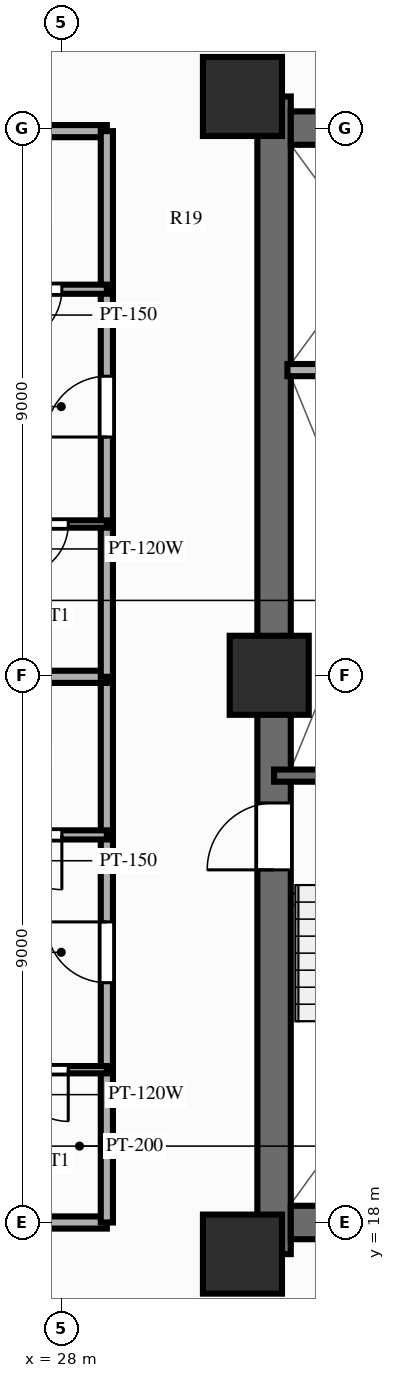
"""IFC4 building model, lengths in metres.
Left out: names, types, materials, properties, quantities, classifications, styles, units other than length and angle.
Written with IfcOpenShell. Run it as: python <this file> out.ifc"""

import sys

from ifc_helpers import new_model, si_unit, direction, frame, frame_2d, origin, origin_2d, place, context, subcontext, project, spatial, rectangle, extrude, source, transform, mapped, element, fill, save


model = new_model("IFC4")
c1 = context("Model", 3, precision=1e-05, world=origin(), true_north=direction((0.0, 1.0)))
c2 = subcontext(c1, "Body", "Model", "MODEL_VIEW")
j1 = project(units=[si_unit("LENGTHUNIT", "METRE"), si_unit("PLANEANGLEUNIT", "RADIAN")], contexts=[c1])
p1 = place(None, origin())
s1 = spatial("IfcSite", under=j1, at=p1, CompositionType="ELEMENT")
p2 = place(p1, origin())
s2 = spatial("IfcBuilding", under=s1, at=p2, CompositionType="ELEMENT")
p3 = place(p2, frame((0.0, 0.0, 77.85)))
s3 = spatial("IfcBuildingStorey", under=s2, at=p3, CompositionType="ELEMENT", Elevation=77.85)
p4 = place(p3, frame((31.5, 17.48, 0.0), z_axis=(0.0, 0.0, 1.0), x_axis=(0.0, 1.0, 0.0)))
e1 = element("IfcWall", 1, at=p4, inside=s3, PredefinedType="SHEAR", context=c2, shape_type="SweptSolid", body=[
    extrude(rectangle(XDim=19.04, YDim=0.55, at=frame_2d((9.52, 0.0))), origin(), (0.0, 0.0, 1.0), 3.0),
])
p5 = place(p4, frame((6.32, 0.0, 0.0)))
e2 = element("IfcOpeningElement", 2, at=p5, cuts=e1, PredefinedType="OPENING", context=c2, shape_type="SweptSolid", body=[
    extrude(rectangle(XDim=1.1, YDim=2.15, at=frame_2d((0.55, 1.075))), frame((0.0, 0.287, 0.0), z_axis=(0.0, -1.0, 0.0), x_axis=(1.0, 0.0, 0.0)), (0.0, 0.0, 1.0), 0.574),
])
p6 = place(p3, frame((31.775, 18.0, 0.0), z_axis=(0.0, 0.0, 1.0), x_axis=(1.0, 0.0, 0.0)))
e3 = element("IfcWall", 3, at=p6, inside=s3, PredefinedType="SHEAR", context=c2, shape_type="SweptSolid", body=[
    extrude(rectangle(XDim=12.45, YDim=0.55, at=frame_2d((6.225, 0.0))), origin(), (0.0, 0.0, 1.0), 3.0),
])
p7 = place(p3, frame((31.775, 36.0, 0.0), z_axis=(0.0, 0.0, 1.0), x_axis=(1.0, 0.0, 0.0)))
e4 = element("IfcWall", 4, at=p7, inside=s3, PredefinedType="SHEAR", context=c2, shape_type="SweptSolid", body=[
    extrude(rectangle(XDim=12.45, YDim=0.55, at=frame_2d((6.225, 0.0))), origin(), (0.0, 0.0, 1.0), 3.0),
])
p8 = place(p7, frame((5.175, 0.0, 0.0), z_axis=(0.0, 0.0, 1.0), x_axis=(-1.0, 0.0, 0.0)))
e5 = element("IfcOpeningElement", 5, at=p8, cuts=e4, PredefinedType="OPENING", context=c2, shape_type="SweptSolid", body=[
    extrude(rectangle(XDim=1.4, YDim=2.15, at=frame_2d((0.7, 1.075))), frame((0.0, 0.287, 0.0), z_axis=(0.0, -1.0, 0.0), x_axis=(1.0, 0.0, 0.0)), (0.0, 0.0, 1.0), 0.574),
])
m1 = source(origin(), c2, "Body", "SweptSolid", [
    extrude(rectangle(XDim=1.3, YDim=1.3, at=origin_2d()), origin(), (0.0, 0.0, 1.0), 3.0),
])
for number, where, z_axis, x_axis in (
    (6, (30.98, 17.48, 0.0), (0.0, 0.0, 1.0), (1.0, 0.0, 0.0)),
    (7, (30.98, 36.52, 0.0), (0.0, 0.0, 1.0), (1.0, 0.0, 0.0)),
    (8, (31.42, 27.0, 0.0), (0.0, 0.0, 1.0), (1.0, 0.0, 0.0)),
):
    element("IfcColumn", number, at=place(p3, frame(where, z_axis=z_axis, x_axis=x_axis)), inside=s3, PredefinedType="COLUMN", context=c2, shape_type="MappedRepresentation", body=[
        mapped(m1, transform((0.0, 0.0, 0.0), scale=1.0)),
    ])
p9 = place(p3, frame((31.5, 25.35, 0.0), z_axis=(0.0, 0.0, 1.0), x_axis=(1.0, 0.0, 0.0)))
e9 = element("IfcWall", 9, at=p9, inside=s3, PredefinedType="SOLIDWALL", context=c2, shape_type="SweptSolid", body=[
    extrude(rectangle(XDim=3.93, YDim=0.2, at=frame_2d((1.965, 0.0))), origin(), (0.0, 0.0, 1.0), 2.79),
])
p10 = place(p3, frame((31.72, 32.02, 0.0), z_axis=(0.0, 0.0, 1.0), x_axis=(1.0, 0.0, 0.0)))
e10 = element("IfcWall", 10, at=p10, inside=s3, PredefinedType="PARTITIONING", context=c2, shape_type="SweptSolid", body=[
    extrude(rectangle(XDim=2.8, YDim=0.2, at=frame_2d((1.4, 0.0))), origin(), (0.0, 0.0, 1.0), 2.79),
])
for number, where, z_axis, x_axis in (
    (11, (28.75, 18.0, 0.0), (0.0, 0.0, 1.0), (-1.0, 0.0, 0.0)),
    (12, (28.75, 35.95, 0.0), (0.0, 0.0, 1.0), (-1.0, 0.0, 0.0)),
):
    element("IfcWall", number, at=place(p3, frame(where, z_axis=z_axis, x_axis=x_axis)), inside=s3, PredefinedType="PARTITIONING", context=c2, shape_type="SweptSolid", body=[
        extrude(rectangle(XDim=16.6, YDim=0.2, at=frame_2d((8.3, 0.0))), origin(), (0.0, 0.0, 1.0), 2.34),
    ])
p11 = place(p3, frame((28.75, 18.0, 0.0), z_axis=(0.0, 0.0, 1.0), x_axis=(0.0, 1.0, 0.0)))
e13 = element("IfcWall", 13, at=p11, inside=s3, PredefinedType="PARTITIONING", context=c2, shape_type="SweptSolid", body=[
    extrude(rectangle(XDim=2.513, YDim=0.2, at=frame_2d((1.256, 0.0))), origin(), (0.0, 0.0, 1.0), 2.79),
])
p12 = place(p3, frame((28.75, 20.513, 0.0), z_axis=(0.0, 0.0, 1.0), x_axis=(0.0, 1.0, 0.0)))
e14 = element("IfcWall", 14, at=p12, inside=s3, PredefinedType="PARTITIONING", context=c2, shape_type="SweptSolid", body=[
    extrude(rectangle(XDim=3.862, YDim=0.2, at=frame_2d((1.931, 0.0))), origin(), (0.0, 0.0, 1.0), 2.79),
])
p13 = place(p12, frame((1.431, 0.0, 0.0)))
e15 = element("IfcOpeningElement", 15, at=p13, cuts=e14, PredefinedType="OPENING", context=c2, shape_type="SweptSolid", body=[
    extrude(rectangle(XDim=1.0, YDim=2.15, at=frame_2d((0.5, 1.075))), frame((0.0, 0.112, 0.0), z_axis=(0.0, -1.0, 0.0), x_axis=(1.0, 0.0, 0.0)), (0.0, 0.0, 1.0), 0.224),
])
p14 = place(p3, frame((28.75, 24.375, 0.0), z_axis=(0.0, 0.0, 1.0), x_axis=(0.0, 1.0, 0.0)))
e16 = element("IfcWall", 16, at=p14, inside=s3, PredefinedType="PARTITIONING", context=c2, shape_type="SweptSolid", body=[
    extrude(rectangle(XDim=2.6, YDim=0.2, at=frame_2d((1.3, 0.0))), origin(), (0.0, 0.0, 1.0), 2.79),
])
p15 = place(p3, frame((28.75, 20.513, 0.0), z_axis=(0.0, 0.0, 1.0), x_axis=(-1.0, 0.0, 0.0)))
e17 = element("IfcWall", 17, at=p15, inside=s3, PredefinedType="PARTITIONING", context=c2, shape_type="SweptSolid", body=[
    extrude(rectangle(XDim=2.12, YDim=0.12, at=frame_2d((1.06, 0.0))), origin(), (0.0, 0.0, 1.0), 2.79),
])
p16 = place(p15, frame((0.635, 0.0, 0.0)))
e18 = element("IfcOpeningElement", 18, at=p16, cuts=e17, PredefinedType="OPENING", context=c2, shape_type="SweptSolid", body=[
    extrude(rectangle(XDim=0.85, YDim=2.05, at=frame_2d((0.425, 1.025))), frame((0.0, 0.072, 0.0), z_axis=(0.0, -1.0, 0.0), x_axis=(1.0, 0.0, 0.0)), (0.0, 0.0, 1.0), 0.144),
])
p17 = place(p3, frame((28.75, 24.375, 0.0), z_axis=(0.0, 0.0, 1.0), x_axis=(-1.0, 0.0, 0.0)))
e19 = element("IfcWall", 19, at=p17, inside=s3, PredefinedType="PARTITIONING", context=c2, shape_type="SweptSolid", body=[
    extrude(rectangle(XDim=2.38, YDim=0.15, at=frame_2d((1.19, 0.0))), origin(), (0.0, 0.0, 1.0), 2.79),
])
p18 = place(p17, frame((0.74, 0.0, 0.0)))
e20 = element("IfcOpeningElement", 20, at=p18, cuts=e19, PredefinedType="OPENING", context=c2, shape_type="SweptSolid", body=[
    extrude(rectangle(XDim=0.9, YDim=2.1, at=frame_2d((0.45, 1.05))), frame((0.0, 0.087, 0.0), z_axis=(0.0, -1.0, 0.0), x_axis=(1.0, 0.0, 0.0)), (0.0, 0.0, 1.0), 0.174),
])
p19 = place(p3, frame((28.75, 26.975, 0.0), z_axis=(0.0, 0.0, 1.0), x_axis=(-1.0, 0.0, 0.0)))
e21 = element("IfcWall", 21, at=p19, inside=s3, PredefinedType="PARTITIONING", context=c2, shape_type="SweptSolid", body=[
    extrude(rectangle(XDim=16.6, YDim=0.2, at=frame_2d((8.3, 0.0))), origin(), (0.0, 0.0, 1.0), 2.79),
])
p20 = place(p3, frame((28.75, 26.975, 0.0), z_axis=(0.0, 0.0, 1.0), x_axis=(0.0, 1.0, 0.0)))
e22 = element("IfcWall", 22, at=p20, inside=s3, PredefinedType="PARTITIONING", context=c2, shape_type="SweptSolid", body=[
    extrude(rectangle(XDim=2.513, YDim=0.2, at=frame_2d((1.256, 0.0))), origin(), (0.0, 0.0, 1.0), 2.79),
])
p21 = place(p3, frame((28.75, 29.488, 0.0), z_axis=(0.0, 0.0, 1.0), x_axis=(0.0, 1.0, 0.0)))
e23 = element("IfcWall", 23, at=p21, inside=s3, PredefinedType="PARTITIONING", context=c2, shape_type="SweptSolid", body=[
    extrude(rectangle(XDim=3.862, YDim=0.2, at=frame_2d((1.931, 0.0))), origin(), (0.0, 0.0, 1.0), 2.79),
])
p22 = place(p21, frame((1.431, 0.0, 0.0)))
e24 = element("IfcOpeningElement", 24, at=p22, cuts=e23, PredefinedType="OPENING", context=c2, shape_type="SweptSolid", body=[
    extrude(rectangle(XDim=1.0, YDim=2.15, at=frame_2d((0.5, 1.075))), frame((0.0, 0.112, 0.0), z_axis=(0.0, -1.0, 0.0), x_axis=(1.0, 0.0, 0.0)), (0.0, 0.0, 1.0), 0.224),
])
p23 = place(p3, frame((28.75, 33.35, 0.0), z_axis=(0.0, 0.0, 1.0), x_axis=(0.0, 1.0, 0.0)))
e25 = element("IfcWall", 25, at=p23, inside=s3, PredefinedType="PARTITIONING", context=c2, shape_type="SweptSolid", body=[
    extrude(rectangle(XDim=2.6, YDim=0.2, at=frame_2d((1.3, 0.0))), origin(), (0.0, 0.0, 1.0), 2.79),
])
p24 = place(p3, frame((28.75, 29.488, 0.0), z_axis=(0.0, 0.0, 1.0), x_axis=(-1.0, 0.0, 0.0)))
e26 = element("IfcWall", 26, at=p24, inside=s3, PredefinedType="PARTITIONING", context=c2, shape_type="SweptSolid", body=[
    extrude(rectangle(XDim=2.12, YDim=0.12, at=frame_2d((1.06, 0.0))), origin(), (0.0, 0.0, 1.0), 2.79),
])
p25 = place(p24, frame((0.635, 0.0, 0.0)))
e27 = element("IfcOpeningElement", 27, at=p25, cuts=e26, PredefinedType="OPENING", context=c2, shape_type="SweptSolid", body=[
    extrude(rectangle(XDim=0.85, YDim=2.05, at=frame_2d((0.425, 1.025))), frame((0.0, 0.072, 0.0), z_axis=(0.0, -1.0, 0.0), x_axis=(1.0, 0.0, 0.0)), (0.0, 0.0, 1.0), 0.144),
])
p26 = place(p3, frame((28.75, 33.35, 0.0), z_axis=(0.0, 0.0, 1.0), x_axis=(-1.0, 0.0, 0.0)))
e28 = element("IfcWall", 28, at=p26, inside=s3, PredefinedType="PARTITIONING", context=c2, shape_type="SweptSolid", body=[
    extrude(rectangle(XDim=2.38, YDim=0.15, at=frame_2d((1.19, 0.0))), origin(), (0.0, 0.0, 1.0), 2.79),
])
p27 = place(p26, frame((0.74, 0.0, 0.0)))
e29 = element("IfcOpeningElement", 29, at=p27, cuts=e28, PredefinedType="OPENING", context=c2, shape_type="SweptSolid", body=[
    extrude(rectangle(XDim=0.9, YDim=2.1, at=frame_2d((0.45, 1.05))), frame((0.0, 0.087, 0.0), z_axis=(0.0, -1.0, 0.0), x_axis=(1.0, 0.0, 0.0)), (0.0, 0.0, 1.0), 0.174),
])
m2 = source(origin(), c2, "Body", "SweptSolid", [
    extrude(rectangle(XDim=1.1, YDim=2.15, at=frame_2d((0.55, 1.075))), frame((0.0, 0.025, 0.0), z_axis=(0.0, -1.0, 0.0), x_axis=(1.0, 0.0, 0.0)), (0.0, 0.0, 1.0), 0.05),
])
p28 = place(p5, origin())
e30 = element("IfcDoor", 30, at=p28, inside=s3, OperationType="SINGLE_SWING_LEFT", PredefinedType="DOOR", context=c2, shape_type="MappedRepresentation", body=[
    mapped(m2, transform((0.0, 0.0, 0.0), scale=1.0)),
])
fill(e2, e30)
m3 = source(origin(), c2, "Body", "SweptSolid", [
    extrude(rectangle(XDim=1.0, YDim=2.15, at=frame_2d((0.5, 1.075))), frame((0.0, 0.025, 0.0), z_axis=(0.0, -1.0, 0.0), x_axis=(1.0, 0.0, 0.0)), (0.0, 0.0, 1.0), 0.05),
])
p29 = place(p13, origin())
e31 = element("IfcDoor", 31, at=p29, inside=s3, OperationType="SINGLE_SWING_RIGHT", PredefinedType="DOOR", context=c2, shape_type="MappedRepresentation", body=[
    mapped(m3, transform((0.0, 0.0, 0.0), scale=1.0)),
])
fill(e15, e31)
m4 = source(origin(), c2, "Body", "SweptSolid", [
    extrude(rectangle(XDim=0.85, YDim=2.05, at=frame_2d((0.425, 1.025))), frame((0.0, 0.025, 0.0), z_axis=(0.0, -1.0, 0.0), x_axis=(1.0, 0.0, 0.0)), (0.0, 0.0, 1.0), 0.05),
])
p30 = place(p16, origin())
e32 = element("IfcDoor", 32, at=p30, inside=s3, OperationType="SINGLE_SWING_LEFT", PredefinedType="DOOR", context=c2, shape_type="MappedRepresentation", body=[
    mapped(m4, transform((0.0, 0.0, 0.0), scale=1.0)),
])
fill(e18, e32)
m5 = source(origin(), c2, "Body", "SweptSolid", [
    extrude(rectangle(XDim=0.9, YDim=2.1, at=frame_2d((0.45, 1.05))), frame((0.0, 0.025, 0.0), z_axis=(0.0, -1.0, 0.0), x_axis=(1.0, 0.0, 0.0)), (0.0, 0.0, 1.0), 0.05),
])
p31 = place(p18, origin())
e33 = element("IfcDoor", 33, at=p31, inside=s3, OperationType="SINGLE_SWING_LEFT", PredefinedType="DOOR", context=c2, shape_type="MappedRepresentation", body=[
    mapped(m5, transform((0.0, 0.0, 0.0), scale=1.0)),
])
fill(e20, e33)
p32 = place(p22, origin())
e34 = element("IfcDoor", 34, at=p32, inside=s3, OperationType="SINGLE_SWING_LEFT", PredefinedType="DOOR", context=c2, shape_type="MappedRepresentation", body=[
    mapped(m3, transform((0.0, 0.0, 0.0), scale=1.0)),
])
fill(e24, e34)
p33 = place(p25, origin())
e35 = element("IfcDoor", 35, at=p33, inside=s3, OperationType="SINGLE_SWING_RIGHT", PredefinedType="DOOR", context=c2, shape_type="MappedRepresentation", body=[
    mapped(m4, transform((0.0, 0.0, 0.0), scale=1.0)),
])
fill(e27, e35)
p34 = place(p27, origin())
e36 = element("IfcDoor", 36, at=p34, inside=s3, OperationType="SINGLE_SWING_RIGHT", PredefinedType="DOOR", context=c2, shape_type="MappedRepresentation", body=[
    mapped(m5, transform((0.0, 0.0, 0.0), scale=1.0)),
])
fill(e29, e36)
save(model, sys.argv[1])
